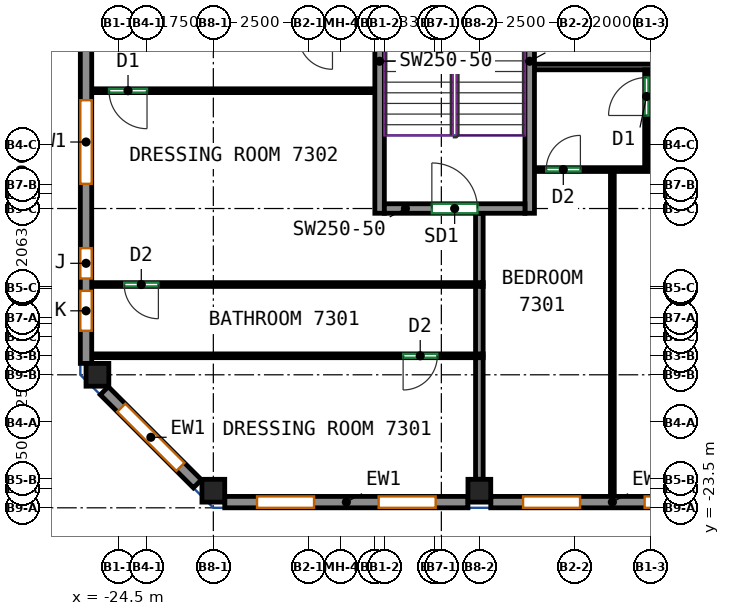
"""IFC4 building model, lengths in metres.
Left out: names, types, materials, properties, quantities, classifications, styles, units other than length and angle.
Written with IfcOpenShell. Run it as: python <this file> out.ifc"""

import sys

from ifc_helpers import new_model, si_unit, direction, frame, frame_2d, origin, origin_2d, place, context, subcontext, project, spatial, rectangle, extrude, source, transform, mapped, element, fill, save


model = new_model("IFC4")
c1 = context("Model", 3, precision=1e-05, world=origin(), true_north=direction((0.0, 1.0)))
c2 = subcontext(c1, "Body", "Model", "MODEL_VIEW")
j1 = project(units=[si_unit("LENGTHUNIT", "METRE"), si_unit("PLANEANGLEUNIT", "RADIAN")], contexts=[c1])
p1 = place(None, origin())
s1 = spatial("IfcSite", under=j1, at=p1, CompositionType="ELEMENT")
p2 = place(p1, origin())
s2 = spatial("IfcBuilding", under=s1, at=p2, CompositionType="ELEMENT")
p3 = place(p2, frame((0.0, 0.0, 295.0)))
s3 = spatial("IfcBuildingStorey", under=s2, at=p3, CompositionType="ELEMENT", Elevation=295.0)
m1 = source(origin(), c2, "Body", "SweptSolid", [
    extrude(rectangle(XDim=0.6, YDim=0.6, at=origin_2d()), origin(), (0.0, 0.0, 1.0), 3.12),
])
for number, where, z_axis, x_axis in (
    (1, (-25.05, -20.0, 0.0), (0.0, 0.0, 1.0), (1.0, 0.0, 0.0)),
    (2, (-22.0, -23.05, 0.0), (0.0, 0.0, 1.0), (1.0, 0.0, 0.0)),
    (3, (-15.0, -23.05, 0.0), (0.0, 0.0, 1.0), (1.0, 0.0, 0.0)),
):
    element("IfcColumn", number, at=place(p3, frame(where, z_axis=z_axis, x_axis=x_axis)), inside=s3, PredefinedType="COLUMN", context=c2, shape_type="MappedRepresentation", body=[
        mapped(m1, transform((0.0, 0.0, 0.0))),
    ])
m2 = source(origin(), c2, "Body", "SweptSolid", [
    extrude(rectangle(XDim=8.0, YDim=0.25, at=frame_2d((4.0, 0.0))), origin(), (0.0, 0.0, 1.0), 3.12),
])
for number, where, z_axis, x_axis in (
    (4, (-17.625, -15.75, 0.0), (0.0, 0.0, 1.0), (0.0, 1.0, 0.0)),
    (5, (-13.675, -15.75, 0.0), (0.0, 0.0, 1.0), (0.0, 1.0, 0.0)),
):
    element("IfcWall", number, at=place(p3, frame(where, z_axis=z_axis, x_axis=x_axis)), inside=s3, PredefinedType="SHEAR", context=c2, shape_type="MappedRepresentation", body=[
        mapped(m2, transform((0.0, 0.0, 0.0))),
    ])
m3 = source(origin(), c2, "Body", "SweptSolid", [
    extrude(rectangle(XDim=3.7, YDim=0.25, at=frame_2d((1.85, 0.0))), origin(), (0.0, 0.0, 1.0), 3.12),
])
p4 = place(p3, frame((-17.5, -15.625, 0.0), z_axis=(0.0, 0.0, 1.0), x_axis=(1.0, 0.0, 0.0)))
e6 = element("IfcWall", 6, at=p4, inside=s3, PredefinedType="SHEAR", context=c2, shape_type="MappedRepresentation", body=[
    mapped(m3, transform((0.0, 0.0, 0.0))),
])
p5 = place(p4, frame((1.25, 0.0, 0.0)))
e7 = element("IfcOpeningElement", 7, at=p5, cuts=e6, PredefinedType="OPENING", context=c2, shape_type="SweptSolid", body=[
    extrude(rectangle(XDim=1.2, YDim=2.1, at=frame_2d((0.6, 1.05))), frame((0.0, 0.135, 0.0), z_axis=(0.0, -1.0, 0.0), x_axis=(1.0, 0.0, 0.0)), (0.0, 0.0, 1.0), 0.27),
])
m4 = source(origin(), c2, "Body", "SweptSolid", [
    extrude(rectangle(XDim=6.4, YDim=0.3, at=frame_2d((3.2, 0.0))), origin(), (0.0, 0.0, 1.0), 3.12),
])
p6 = place(p3, frame((-21.7, -23.35, 0.0), z_axis=(0.0, 0.0, 1.0), x_axis=(1.0, 0.0, 0.0)))
e8 = element("IfcWall", 8, at=p6, inside=s3, PredefinedType="SOLIDWALL", context=c2, shape_type="MappedRepresentation", body=[
    mapped(m4, transform((0.0, 0.0, 0.0))),
])
p7 = place(p6, frame((0.85, 0.0, 0.8)))
e9 = element("IfcOpeningElement", 9, at=p7, cuts=e8, PredefinedType="OPENING", context=c2, shape_type="SweptSolid", body=[
    extrude(rectangle(XDim=1.5, YDim=2.05, at=frame_2d((0.75, 1.025))), frame((0.0, 0.16, 0.0), z_axis=(0.0, -1.0, 0.0), x_axis=(1.0, 0.0, 0.0)), (0.0, 0.0, 1.0), 0.32),
])
p8 = place(p6, frame((4.05, 0.0, 0.8)))
e10 = element("IfcOpeningElement", 10, at=p8, cuts=e8, PredefinedType="OPENING", context=c2, shape_type="SweptSolid", body=[
    extrude(rectangle(XDim=1.5, YDim=2.05, at=frame_2d((0.75, 1.025))), frame((0.0, 0.16, 0.0), z_axis=(0.0, -1.0, 0.0), x_axis=(1.0, 0.0, 0.0)), (0.0, 0.0, 1.0), 0.32),
])
p9 = place(p3, frame((-14.7, -23.35, 0.0), z_axis=(0.0, 0.0, 1.0), x_axis=(1.0, 0.0, 0.0)))
e11 = element("IfcWall", 11, at=p9, inside=s3, PredefinedType="SOLIDWALL", context=c2, shape_type="MappedRepresentation", body=[
    mapped(m4, transform((0.0, 0.0, 0.0))),
])
p10 = place(p9, frame((0.85, 0.0, 0.8)))
e12 = element("IfcOpeningElement", 12, at=p10, cuts=e11, PredefinedType="OPENING", context=c2, shape_type="SweptSolid", body=[
    extrude(rectangle(XDim=1.5, YDim=2.05, at=frame_2d((0.75, 1.025))), frame((0.0, 0.16, 0.0), z_axis=(0.0, -1.0, 0.0), x_axis=(1.0, 0.0, 0.0)), (0.0, 0.0, 1.0), 0.32),
])
p11 = place(p9, frame((4.05, 0.0, 0.8)))
e13 = element("IfcOpeningElement", 13, at=p11, cuts=e11, PredefinedType="OPENING", context=c2, shape_type="SweptSolid", body=[
    extrude(rectangle(XDim=1.5, YDim=2.05, at=frame_2d((0.75, 1.025))), frame((0.0, 0.16, 0.0), z_axis=(0.0, -1.0, 0.0), x_axis=(1.0, 0.0, 0.0)), (0.0, 0.0, 1.0), 0.32),
])
m5 = source(origin(), c2, "Body", "SweptSolid", [
    extrude(rectangle(XDim=11.65, YDim=0.3, at=frame_2d((5.825, 0.0))), origin(), (0.0, 0.0, 1.0), 3.12),
])
p12 = place(p3, frame((-25.35, -8.05, 0.0), z_axis=(0.0, 0.0, 1.0), x_axis=(0.0, -1.0, 0.0)))
e14 = element("IfcWall", 14, at=p12, inside=s3, PredefinedType="SOLIDWALL", context=c2, shape_type="MappedRepresentation", body=[
    mapped(m5, transform((0.0, 0.0, 0.0))),
])
p13 = place(p12, frame((0.842, 0.0, 0.8)))
e15 = element("IfcOpeningElement", 15, at=p13, cuts=e14, PredefinedType="OPENING", context=c2, shape_type="SweptSolid", body=[
    extrude(rectangle(XDim=2.2, YDim=2.05, at=frame_2d((1.1, 1.025))), frame((0.0, 0.16, 0.0), z_axis=(0.0, -1.0, 0.0), x_axis=(1.0, 0.0, 0.0)), (0.0, 0.0, 1.0), 0.32),
])
p14 = place(p12, frame((4.725, 0.0, 0.8)))
e16 = element("IfcOpeningElement", 16, at=p14, cuts=e14, PredefinedType="OPENING", context=c2, shape_type="SweptSolid", body=[
    extrude(rectangle(XDim=2.2, YDim=2.05, at=frame_2d((1.1, 1.025))), frame((0.0, 0.16, 0.0), z_axis=(0.0, -1.0, 0.0), x_axis=(1.0, 0.0, 0.0)), (0.0, 0.0, 1.0), 0.32),
])
p15 = place(p12, frame((8.617, 0.0, 0.8)))
e17 = element("IfcOpeningElement", 17, at=p15, cuts=e14, PredefinedType="OPENING", context=c2, shape_type="SweptSolid", body=[
    extrude(rectangle(XDim=0.8, YDim=2.05, at=frame_2d((0.4, 1.025))), frame((0.0, 0.16, 0.0), z_axis=(0.0, -1.0, 0.0), x_axis=(1.0, 0.0, 0.0)), (0.0, 0.0, 1.0), 0.32),
])
p16 = place(p12, frame((9.742, 0.0, 0.8)))
e18 = element("IfcOpeningElement", 18, at=p16, cuts=e14, PredefinedType="OPENING", context=c2, shape_type="SweptSolid", body=[
    extrude(rectangle(XDim=1.05, YDim=2.05, at=frame_2d((0.525, 1.025))), frame((0.0, 0.16, 0.0), z_axis=(0.0, -1.0, 0.0), x_axis=(1.0, 0.0, 0.0)), (0.0, 0.0, 1.0), 0.32),
])
m6 = source(origin(), c2, "Body", "SweptSolid", [
    extrude(rectangle(XDim=3.465, YDim=0.3, at=frame_2d((1.732, 0.0))), origin(), (0.0, 0.0, 1.0), 3.12),
])
p17 = place(p3, frame((-24.869, -20.419, 0.0), z_axis=(0.0, 0.0, 1.0), x_axis=(0.707106781187, -0.707106781187, 0.0)))
e19 = element("IfcWall", 19, at=p17, inside=s3, PredefinedType="SOLIDWALL", context=c2, shape_type="MappedRepresentation", body=[
    mapped(m6, transform((0.0, 0.0, 0.0))),
])
p18 = place(p17, frame((0.632, 0.0, 0.8)))
e20 = element("IfcOpeningElement", 20, at=p18, cuts=e19, PredefinedType="OPENING", context=c2, shape_type="SweptSolid", body=[
    extrude(rectangle(XDim=2.2, YDim=2.05, at=frame_2d((1.1, 1.025))), frame((0.0, 0.16, 0.0), z_axis=(0.0, -1.0, 0.0), x_axis=(1.0, 0.0, 0.0)), (0.0, 0.0, 1.0), 0.32),
])
p19 = place(p3, frame((-13.55, -11.9, 0.0), z_axis=(0.0, 0.0, 1.0), x_axis=(1.0, 0.0, 0.0)))
e21 = element("IfcWall", 21, at=p19, inside=s3, PredefinedType="PARTITIONING", context=c2, shape_type="SweptSolid", body=[
    extrude(rectangle(XDim=31.3, YDim=0.15, at=frame_2d((15.65, 0.0))), origin(), (0.0, 0.0, 1.0), 3.12),
])
p20 = place(p19, frame((3.747, 0.0, 0.0)))
e22 = element("IfcOpeningElement", 22, at=p20, cuts=e21, PredefinedType="OPENING", context=c2, shape_type="SweptSolid", body=[
    extrude(rectangle(XDim=1.0, YDim=2.1, at=frame_2d((0.5, 1.05))), frame((0.0, 0.085, 0.0), z_axis=(0.0, -1.0, 0.0), x_axis=(1.0, 0.0, 0.0)), (0.0, 0.0, 1.0), 0.17),
])
p21 = place(p19, frame((22.835, 0.0, 0.0)))
e23 = element("IfcOpeningElement", 23, at=p21, cuts=e21, PredefinedType="OPENING", context=c2, shape_type="SweptSolid", body=[
    extrude(rectangle(XDim=1.0, YDim=2.1, at=frame_2d((0.5, 1.05))), frame((0.0, 0.085, 0.0), z_axis=(0.0, -1.0, 0.0), x_axis=(1.0, 0.0, 0.0)), (0.0, 0.0, 1.0), 0.17),
])
p22 = place(p3, frame((-14.9, -19.5, 0.0), z_axis=(0.0, 0.0, 1.0), x_axis=(-1.0, 0.0, 0.0)))
e24 = element("IfcWall", 24, at=p22, inside=s3, PredefinedType="PARTITIONING", context=c2, shape_type="SweptSolid", body=[
    extrude(rectangle(XDim=10.35, YDim=0.1, at=frame_2d((5.175, 0.0))), origin(), (0.0, 0.0, 1.0), 3.12),
])
p23 = place(p22, frame((1.206, 0.0, 0.0)))
e25 = element("IfcOpeningElement", 25, at=p23, cuts=e24, PredefinedType="OPENING", context=c2, shape_type="SweptSolid", body=[
    extrude(rectangle(XDim=0.9, YDim=2.1, at=frame_2d((0.45, 1.05))), frame((0.0, 0.06, 0.0), z_axis=(0.0, -1.0, 0.0), x_axis=(1.0, 0.0, 0.0)), (0.0, 0.0, 1.0), 0.12),
])
p24 = place(p3, frame((-15.0, -22.75, 0.0), z_axis=(0.0, 0.0, 1.0), x_axis=(0.0, 1.0, 0.0)))
e26 = element("IfcWall", 26, at=p24, inside=s3, PredefinedType="PARTITIONING", context=c2, shape_type="SweptSolid", body=[
    extrude(rectangle(XDim=3.2, YDim=0.2, at=frame_2d((1.6, 0.0))), origin(), (0.0, 0.0, 1.0), 3.12),
])
p25 = place(p3, frame((-14.9, -17.625, 0.0), z_axis=(0.0, 0.0, 1.0), x_axis=(-1.0, 0.0, 0.0)))
e27 = element("IfcWall", 27, at=p25, inside=s3, PredefinedType="PARTITIONING", context=c2, shape_type="SweptSolid", body=[
    extrude(rectangle(XDim=10.35, YDim=0.1, at=frame_2d((5.175, 0.0))), origin(), (0.0, 0.0, 1.0), 3.12),
])
p26 = place(p25, frame((8.546, 0.0, 0.0)))
e28 = element("IfcOpeningElement", 28, at=p26, cuts=e27, PredefinedType="OPENING", context=c2, shape_type="SweptSolid", body=[
    extrude(rectangle(XDim=0.9, YDim=2.1, at=frame_2d((0.45, 1.05))), frame((0.0, 0.06, 0.0), z_axis=(0.0, -1.0, 0.0), x_axis=(1.0, 0.0, 0.0)), (0.0, 0.0, 1.0), 0.12),
])
p27 = place(p3, frame((-15.0, -19.45, 0.0), z_axis=(0.0, 0.0, 1.0), x_axis=(0.0, 1.0, 0.0)))
e29 = element("IfcWall", 29, at=p27, inside=s3, PredefinedType="PARTITIONING", context=c2, shape_type="SweptSolid", body=[
    extrude(rectangle(XDim=1.775, YDim=0.2, at=frame_2d((0.887, 0.0))), origin(), (0.0, 0.0, 1.0), 3.12),
])
p28 = place(p3, frame((-17.75, -12.525, 0.0), z_axis=(0.0, 0.0, 1.0), x_axis=(-1.0, 0.0, 0.0)))
e30 = element("IfcWall", 30, at=p28, inside=s3, PredefinedType="PARTITIONING", context=c2, shape_type="SweptSolid", body=[
    extrude(rectangle(XDim=7.5, YDim=0.1, at=frame_2d((3.75, 0.0))), origin(), (0.0, 0.0, 1.0), 3.12),
])
p29 = place(p28, frame((5.995, 0.0, 0.0)))
e31 = element("IfcOpeningElement", 31, at=p29, cuts=e30, PredefinedType="OPENING", context=c2, shape_type="SweptSolid", body=[
    extrude(rectangle(XDim=1.0, YDim=2.1, at=frame_2d((0.5, 1.05))), frame((0.0, 0.06, 0.0), z_axis=(0.0, -1.0, 0.0), x_axis=(1.0, 0.0, 0.0)), (0.0, 0.0, 1.0), 0.12),
])
p30 = place(p3, frame((-15.0, -17.575, 0.0), z_axis=(0.0, 0.0, 1.0), x_axis=(0.0, 1.0, 0.0)))
e32 = element("IfcWall", 32, at=p30, inside=s3, PredefinedType="PARTITIONING", context=c2, shape_type="SweptSolid", body=[
    extrude(rectangle(XDim=1.825, YDim=0.2, at=frame_2d((0.913, 0.0))), origin(), (0.0, 0.0, 1.0), 3.12),
])
p31 = place(p3, frame((-10.6, -14.55, 0.0), z_axis=(0.0, 0.0, 1.0), x_axis=(0.0, 1.0, 0.0)))
e33 = element("IfcWall", 33, at=p31, inside=s3, PredefinedType="PARTITIONING", context=c2, shape_type="SweptSolid", body=[
    extrude(rectangle(XDim=2.573, YDim=0.1, at=frame_2d((1.287, 0.0))), origin(), (0.0, 0.0, 1.0), 3.12),
])
p32 = place(p31, frame((1.373, 0.0, 0.0)))
e34 = element("IfcOpeningElement", 34, at=p32, cuts=e33, PredefinedType="OPENING", context=c2, shape_type="SweptSolid", body=[
    extrude(rectangle(XDim=1.0, YDim=2.1, at=frame_2d((0.5, 1.05))), frame((0.0, 0.06, 0.0), z_axis=(0.0, -1.0, 0.0), x_axis=(1.0, 0.0, 0.0)), (0.0, 0.0, 1.0), 0.12),
])
p33 = place(p3, frame((-13.55, -14.6, 0.0), z_axis=(0.0, 0.0, 1.0), x_axis=(1.0, 0.0, 0.0)))
e35 = element("IfcWall", 35, at=p33, inside=s3, PredefinedType="PARTITIONING", context=c2, shape_type="SweptSolid", body=[
    extrude(rectangle(XDim=31.3, YDim=0.1, at=frame_2d((15.65, 0.0))), origin(), (0.0, 0.0, 1.0), 3.12),
])
p34 = place(p33, frame((0.309, 0.0, 0.0)))
e36 = element("IfcOpeningElement", 36, at=p34, cuts=e35, PredefinedType="OPENING", context=c2, shape_type="SweptSolid", body=[
    extrude(rectangle(XDim=0.9, YDim=2.1, at=frame_2d((0.45, 1.05))), frame((0.0, 0.06, 0.0), z_axis=(0.0, -1.0, 0.0), x_axis=(1.0, 0.0, 0.0)), (0.0, 0.0, 1.0), 0.12),
])
p35 = place(p33, frame((4.103, 0.0, 0.0)))
e37 = element("IfcOpeningElement", 37, at=p35, cuts=e35, PredefinedType="OPENING", context=c2, shape_type="SweptSolid", body=[
    extrude(rectangle(XDim=1.0, YDim=2.1, at=frame_2d((0.5, 1.05))), frame((0.0, 0.06, 0.0), z_axis=(0.0, -1.0, 0.0), x_axis=(1.0, 0.0, 0.0)), (0.0, 0.0, 1.0), 0.12),
])
p36 = place(p33, frame((13.955, 0.0, 0.0)))
e38 = element("IfcOpeningElement", 38, at=p36, cuts=e35, PredefinedType="OPENING", context=c2, shape_type="SweptSolid", body=[
    extrude(rectangle(XDim=0.9, YDim=2.1, at=frame_2d((0.45, 1.05))), frame((0.0, 0.06, 0.0), z_axis=(0.0, -1.0, 0.0), x_axis=(1.0, 0.0, 0.0)), (0.0, 0.0, 1.0), 0.12),
])
p37 = place(p33, frame((17.453, 0.0, 0.0)))
e39 = element("IfcOpeningElement", 39, at=p37, cuts=e35, PredefinedType="OPENING", context=c2, shape_type="SweptSolid", body=[
    extrude(rectangle(XDim=1.0, YDim=2.1, at=frame_2d((0.5, 1.05))), frame((0.0, 0.06, 0.0), z_axis=(0.0, -1.0, 0.0), x_axis=(1.0, 0.0, 0.0)), (0.0, 0.0, 1.0), 0.12),
])
p38 = place(p33, frame((23.13, 0.0, 0.0)))
e40 = element("IfcOpeningElement", 40, at=p38, cuts=e35, PredefinedType="OPENING", context=c2, shape_type="SweptSolid", body=[
    extrude(rectangle(XDim=1.0, YDim=2.1, at=frame_2d((0.5, 1.05))), frame((0.0, 0.06, 0.0), z_axis=(0.0, -1.0, 0.0), x_axis=(1.0, 0.0, 0.0)), (0.0, 0.0, 1.0), 0.12),
])
p39 = place(p3, frame((-11.5, -23.25, 0.0), z_axis=(0.0, 0.0, 1.0), x_axis=(0.0, 1.0, 0.0)))
e41 = element("IfcWall", 41, at=p39, inside=s3, PredefinedType="PARTITIONING", context=c2, shape_type="SweptSolid", body=[
    extrude(rectangle(XDim=8.598, YDim=0.1, at=frame_2d((4.299, 0.0))), origin(), (0.0, 0.0, 1.0), 3.12),
])
p40 = place(p7, origin())
e42 = element("IfcWindow", 42, at=p40, inside=s3, PartitioningType="SINGLE_PANEL", PredefinedType="WINDOW", context=c2, shape_type="SweptSolid", body=[
    extrude(rectangle(XDim=1.5, YDim=2.05, at=frame_2d((0.75, 1.025))), frame((0.0, 0.03, 0.0), z_axis=(0.0, -1.0, 0.0), x_axis=(1.0, 0.0, 0.0)), (0.0, 0.0, 1.0), 0.06),
])
fill(e9, e42)
p41 = place(p8, origin())
e43 = element("IfcWindow", 43, at=p41, inside=s3, PartitioningType="SINGLE_PANEL", PredefinedType="WINDOW", context=c2, shape_type="SweptSolid", body=[
    extrude(rectangle(XDim=1.5, YDim=2.05, at=frame_2d((0.75, 1.025))), frame((0.0, 0.03, 0.0), z_axis=(0.0, -1.0, 0.0), x_axis=(1.0, 0.0, 0.0)), (0.0, 0.0, 1.0), 0.06),
])
fill(e10, e43)
p42 = place(p10, origin())
e44 = element("IfcWindow", 44, at=p42, inside=s3, PartitioningType="SINGLE_PANEL", PredefinedType="WINDOW", context=c2, shape_type="SweptSolid", body=[
    extrude(rectangle(XDim=1.5, YDim=2.05, at=frame_2d((0.75, 1.025))), frame((0.0, 0.03, 0.0), z_axis=(0.0, -1.0, 0.0), x_axis=(1.0, 0.0, 0.0)), (0.0, 0.0, 1.0), 0.06),
])
fill(e12, e44)
p43 = place(p11, origin())
e45 = element("IfcWindow", 45, at=p43, inside=s3, PartitioningType="SINGLE_PANEL", PredefinedType="WINDOW", context=c2, shape_type="SweptSolid", body=[
    extrude(rectangle(XDim=1.5, YDim=2.05, at=frame_2d((0.75, 1.025))), frame((0.0, 0.03, 0.0), z_axis=(0.0, -1.0, 0.0), x_axis=(1.0, 0.0, 0.0)), (0.0, 0.0, 1.0), 0.06),
])
fill(e13, e45)
p44 = place(p14, origin())
e46 = element("IfcWindow", 46, at=p44, inside=s3, PartitioningType="SINGLE_PANEL", PredefinedType="WINDOW", context=c2, shape_type="SweptSolid", body=[
    extrude(rectangle(XDim=2.2, YDim=2.05, at=frame_2d((1.1, 1.025))), frame((0.0, 0.03, 0.0), z_axis=(0.0, -1.0, 0.0), x_axis=(1.0, 0.0, 0.0)), (0.0, 0.0, 1.0), 0.06),
])
fill(e16, e46)
p45 = place(p15, origin())
e47 = element("IfcWindow", 47, at=p45, inside=s3, PartitioningType="SINGLE_PANEL", PredefinedType="WINDOW", context=c2, shape_type="SweptSolid", body=[
    extrude(rectangle(XDim=0.8, YDim=2.05, at=frame_2d((0.4, 1.025))), frame((0.0, 0.03, 0.0), z_axis=(0.0, -1.0, 0.0), x_axis=(1.0, 0.0, 0.0)), (0.0, 0.0, 1.0), 0.06),
])
fill(e17, e47)
p46 = place(p18, origin())
e48 = element("IfcWindow", 48, at=p46, inside=s3, PartitioningType="SINGLE_PANEL", PredefinedType="WINDOW", context=c2, shape_type="SweptSolid", body=[
    extrude(rectangle(XDim=2.2, YDim=2.05, at=frame_2d((1.1, 1.025))), frame((0.0, 0.03, 0.0), z_axis=(0.0, -1.0, 0.0), x_axis=(1.0, 0.0, 0.0)), (0.0, 0.0, 1.0), 0.06),
])
fill(e20, e48)
p47 = place(p5, origin())
e49 = element("IfcDoor", 49, at=p47, inside=s3, OperationType="DOUBLE_DOOR_SINGLE_SWING", PredefinedType="DOOR", context=c2, shape_type="SweptSolid", body=[
    extrude(rectangle(XDim=1.2, YDim=2.1, at=frame_2d((0.6, 1.05))), frame((0.0, 0.025, 0.0), z_axis=(0.0, -1.0, 0.0), x_axis=(1.0, 0.0, 0.0)), (0.0, 0.0, 1.0), 0.05),
])
fill(e7, e49)
p48 = place(p23, origin())
e50 = element("IfcDoor", 50, at=p48, inside=s3, OperationType="SINGLE_SWING_RIGHT", PredefinedType="DOOR", context=c2, shape_type="SweptSolid", body=[
    extrude(rectangle(XDim=0.9, YDim=2.1, at=frame_2d((0.45, 1.05))), frame((0.0, 0.025, 0.0), z_axis=(0.0, -1.0, 0.0), x_axis=(1.0, 0.0, 0.0)), (0.0, 0.0, 1.0), 0.05),
])
fill(e25, e50)
p49 = place(p26, origin())
e51 = element("IfcDoor", 51, at=p49, inside=s3, OperationType="SINGLE_SWING_LEFT", PredefinedType="DOOR", context=c2, shape_type="SweptSolid", body=[
    extrude(rectangle(XDim=0.9, YDim=2.1, at=frame_2d((0.45, 1.05))), frame((0.0, 0.025, 0.0), z_axis=(0.0, -1.0, 0.0), x_axis=(1.0, 0.0, 0.0)), (0.0, 0.0, 1.0), 0.05),
])
fill(e28, e51)
p50 = place(p34, origin())
e52 = element("IfcDoor", 52, at=p50, inside=s3, OperationType="SINGLE_SWING_RIGHT", PredefinedType="DOOR", context=c2, shape_type="SweptSolid", body=[
    extrude(rectangle(XDim=0.9, YDim=2.1, at=frame_2d((0.45, 1.05))), frame((0.0, 0.025, 0.0), z_axis=(0.0, -1.0, 0.0), x_axis=(1.0, 0.0, 0.0)), (0.0, 0.0, 1.0), 0.05),
])
fill(e36, e52)
p51 = place(p32, origin())
e53 = element("IfcDoor", 53, at=p51, inside=s3, OperationType="SINGLE_SWING_LEFT", PredefinedType="DOOR", context=c2, shape_type="SweptSolid", body=[
    extrude(rectangle(XDim=1.0, YDim=2.1, at=frame_2d((0.5, 1.05))), frame((0.0, 0.025, 0.0), z_axis=(0.0, -1.0, 0.0), x_axis=(1.0, 0.0, 0.0)), (0.0, 0.0, 1.0), 0.05),
])
fill(e34, e53)
p52 = place(p29, origin())
e54 = element("IfcDoor", 54, at=p52, inside=s3, OperationType="SINGLE_SWING_LEFT", PredefinedType="DOOR", context=c2, shape_type="SweptSolid", body=[
    extrude(rectangle(XDim=1.0, YDim=2.1, at=frame_2d((0.5, 1.05))), frame((0.0, 0.025, 0.0), z_axis=(0.0, -1.0, 0.0), x_axis=(1.0, 0.0, 0.0)), (0.0, 0.0, 1.0), 0.05),
])
fill(e31, e54)
p53 = place(p16, origin())
e55 = element("IfcWindow", 55, at=p53, inside=s3, PartitioningType="SINGLE_PANEL", PredefinedType="WINDOW", context=c2, shape_type="SweptSolid", body=[
    extrude(rectangle(XDim=1.05, YDim=2.05, at=frame_2d((0.525, 1.025))), frame((0.0, 0.03, 0.0), z_axis=(0.0, -1.0, 0.0), x_axis=(1.0, 0.0, 0.0)), (0.0, 0.0, 1.0), 0.06),
])
fill(e18, e55)
save(model, sys.argv[1])
